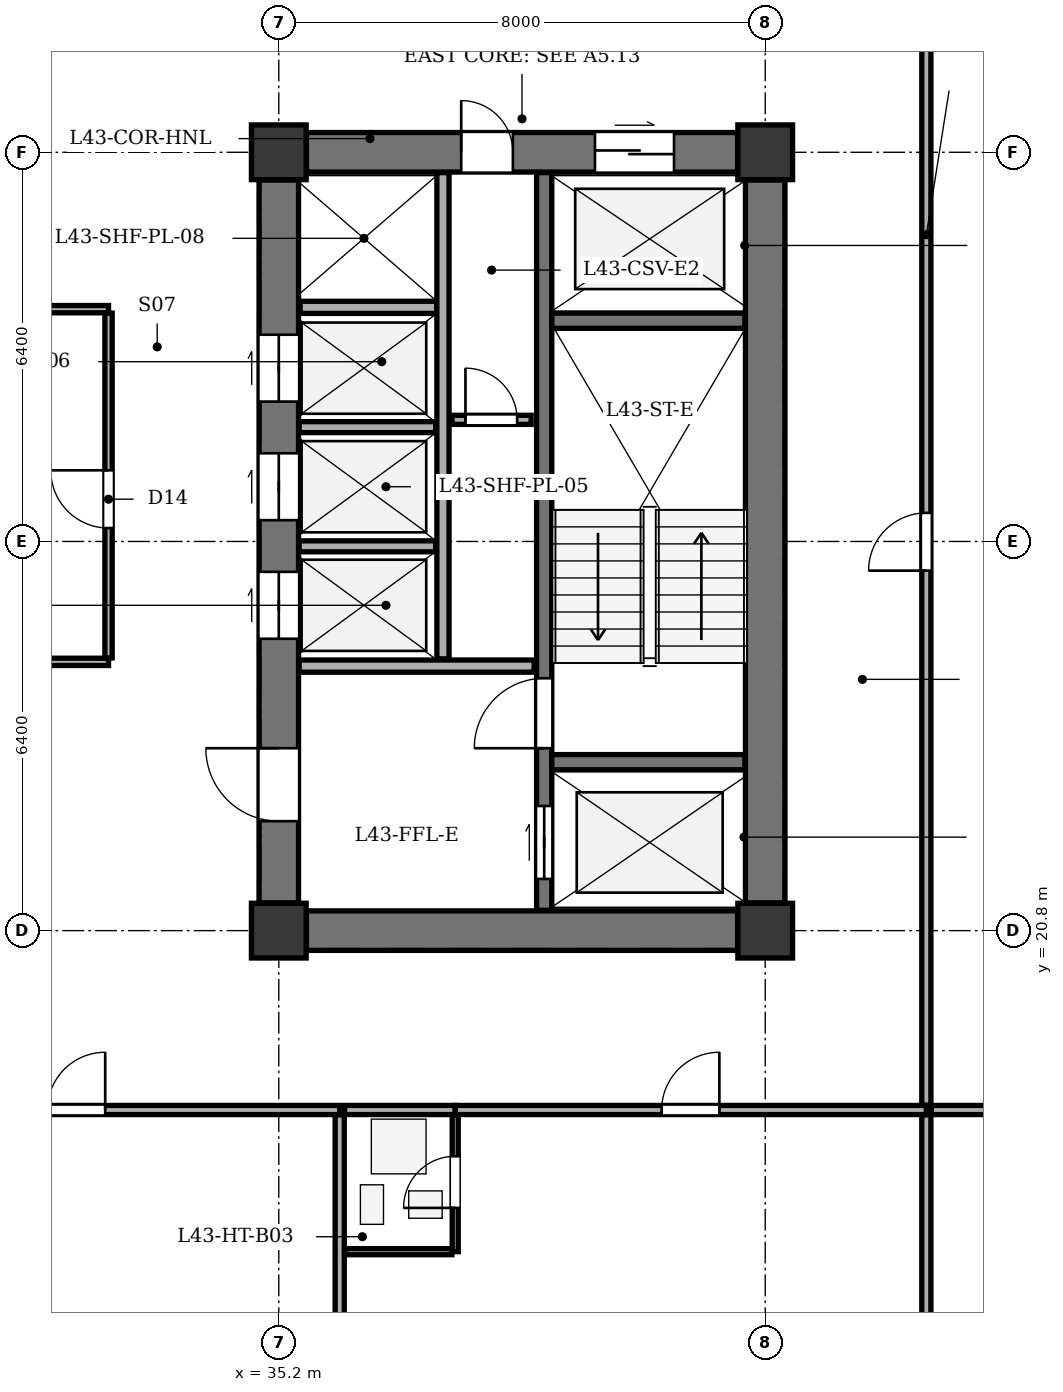
"""IFC4 building model, lengths in metres.
Left out: names, types, materials, properties, quantities, classifications, styles, units other than length and angle.
Written with IfcOpenShell. Run it as: python <this file> out.ifc"""

import sys

from ifc_helpers import new_model, si_unit, direction, frame, frame_2d, origin, origin_2d, place, context, subcontext, project, spatial, rectangle, extrude, element, fill, save


model = new_model("IFC4")
c1 = context("Model", 3, precision=1e-05, world=origin(), true_north=direction((0.0, 1.0)))
c2 = subcontext(c1, "Body", "Model", "MODEL_VIEW")
j1 = project(units=[si_unit("LENGTHUNIT", "METRE"), si_unit("PLANEANGLEUNIT", "RADIAN")], contexts=[c1])
p1 = place(None, origin())
s1 = spatial("IfcSite", under=j1, at=p1, CompositionType="ELEMENT")
p2 = place(p1, origin())
s2 = spatial("IfcBuilding", under=s1, at=p2, CompositionType="ELEMENT")
p3 = place(p2, frame((0.0, 0.0, 169.3)))
s3 = spatial("IfcBuildingStorey", under=s2, at=p3, CompositionType="ELEMENT", Elevation=169.3)
for number, where, z_axis, x_axis in (
    (1, (35.2, 20.8, 0.0), (0.0, 0.0, 1.0), (1.0, 0.0, 0.0)),
    (2, (43.2, 20.8, 0.0), (0.0, 0.0, 1.0), (1.0, 0.0, 0.0)),
    (3, (35.2, 33.6, 0.0), (0.0, 0.0, 1.0), (1.0, 0.0, 0.0)),
    (4, (43.2, 33.6, 0.0), (0.0, 0.0, 1.0), (1.0, 0.0, 0.0)),
):
    element("IfcColumn", number, at=place(p3, frame(where, z_axis=z_axis, x_axis=x_axis)), inside=s3, PredefinedType="COLUMN", context=c2, shape_type="SweptSolid", body=[
        extrude(rectangle(XDim=0.9, YDim=0.9, at=origin_2d()), origin(), (0.0, 0.0, 1.0), 3.5),
    ])
p4 = place(p3, frame((43.2, 21.255, 0.0), z_axis=(0.0, 0.0, 1.0), x_axis=(0.0, 1.0, 0.0)))
e5 = element("IfcWall", 5, at=p4, inside=s3, PredefinedType="SHEAR", context=c2, shape_type="SweptSolid", body=[
    extrude(rectangle(XDim=11.89, YDim=0.65, at=frame_2d((5.945, 0.0))), origin(), (0.0, 0.0, 1.0), 3.2),
])
p5 = place(p3, frame((35.655, 20.8, 0.0), z_axis=(0.0, 0.0, 1.0), x_axis=(1.0, 0.0, 0.0)))
e6 = element("IfcWall", 6, at=p5, inside=s3, PredefinedType="SHEAR", context=c2, shape_type="SweptSolid", body=[
    extrude(rectangle(XDim=7.09, YDim=0.65, at=frame_2d((3.545, 0.0))), origin(), (0.0, 0.0, 1.0), 3.2),
])
p6 = place(p3, frame((35.655, 33.6, 0.0), z_axis=(0.0, 0.0, 1.0), x_axis=(1.0, 0.0, 0.0)))
e7 = element("IfcWall", 7, at=p6, inside=s3, PredefinedType="SHEAR", context=c2, shape_type="SweptSolid", body=[
    extrude(rectangle(XDim=7.09, YDim=0.65, at=frame_2d((3.545, 0.0))), origin(), (0.0, 0.0, 1.0), 3.2),
])
p7 = place(p6, frame((4.745, 0.0, 0.0)))
e8 = element("IfcOpeningElement", 8, at=p7, cuts=e7, PredefinedType="OPENING", context=c2, shape_type="SweptSolid", body=[
    extrude(rectangle(XDim=1.3, YDim=2.15, at=frame_2d((0.65, 1.075))), frame((0.0, 0.335, 0.0), z_axis=(0.0, -1.0, 0.0), x_axis=(1.0, 0.0, 0.0)), (0.0, 0.0, 1.0), 0.67),
])
p8 = place(p6, frame((2.545, 0.0, 0.0)))
e9 = element("IfcOpeningElement", 9, at=p8, cuts=e7, PredefinedType="OPENING", context=c2, shape_type="SweptSolid", body=[
    extrude(rectangle(XDim=0.85, YDim=2.02, at=frame_2d((0.425, 1.01))), frame((0.0, 0.335, 0.0), z_axis=(0.0, -1.0, 0.0), x_axis=(1.0, 0.0, 0.0)), (0.0, 0.0, 1.0), 0.67),
])
p9 = place(p3, frame((35.2, 21.255, 0.0), z_axis=(0.0, 0.0, 1.0), x_axis=(0.0, 1.0, 0.0)))
e10 = element("IfcWall", 10, at=p9, inside=s3, PredefinedType="SHEAR", context=c2, shape_type="SweptSolid", body=[
    extrude(rectangle(XDim=11.89, YDim=0.65, at=frame_2d((5.945, 0.0))), origin(), (0.0, 0.0, 1.0), 3.2),
])
p10 = place(p9, frame((1.345, 0.0, 0.0)))
e11 = element("IfcOpeningElement", 11, at=p10, cuts=e10, PredefinedType="OPENING", context=c2, shape_type="SweptSolid", body=[
    extrude(rectangle(XDim=1.2, YDim=2.15, at=frame_2d((0.6, 1.075))), frame((0.0, 0.335, 0.0), z_axis=(0.0, -1.0, 0.0), x_axis=(1.0, 0.0, 0.0)), (0.0, 0.0, 1.0), 0.67),
])
p11 = place(p9, frame((4.345, 0.0, 0.0)))
e12 = element("IfcOpeningElement", 12, at=p11, cuts=e10, PredefinedType="OPENING", context=c2, shape_type="SweptSolid", body=[
    extrude(rectangle(XDim=1.1, YDim=2.1, at=frame_2d((0.55, 1.05))), frame((0.0, 0.335, 0.0), z_axis=(0.0, -1.0, 0.0), x_axis=(1.0, 0.0, 0.0)), (0.0, 0.0, 1.0), 0.67),
])
p12 = place(p9, frame((6.295, 0.0, 0.0)))
e13 = element("IfcOpeningElement", 13, at=p12, cuts=e10, PredefinedType="OPENING", context=c2, shape_type="SweptSolid", body=[
    extrude(rectangle(XDim=1.1, YDim=2.1, at=frame_2d((0.55, 1.05))), frame((0.0, 0.335, 0.0), z_axis=(0.0, -1.0, 0.0), x_axis=(1.0, 0.0, 0.0)), (0.0, 0.0, 1.0), 0.67),
])
p13 = place(p9, frame((8.245, 0.0, 0.0)))
e14 = element("IfcOpeningElement", 14, at=p13, cuts=e10, PredefinedType="OPENING", context=c2, shape_type="SweptSolid", body=[
    extrude(rectangle(XDim=1.1, YDim=2.1, at=frame_2d((0.55, 1.05))), frame((0.0, 0.335, 0.0), z_axis=(0.0, -1.0, 0.0), x_axis=(1.0, 0.0, 0.0)), (0.0, 0.0, 1.0), 0.67),
])
p14 = place(p3, frame((39.565, 21.135, 0.0), z_axis=(0.0, 0.0, 1.0), x_axis=(0.0, 1.0, 0.0)))
e15 = element("IfcWall", 15, at=p14, inside=s3, PredefinedType="SHEAR", context=c2, shape_type="SweptSolid", body=[
    extrude(rectangle(XDim=12.13, YDim=0.25, at=frame_2d((6.065, 0.0))), origin(), (0.0, 0.0, 1.0), 3.2),
])
p15 = place(p14, frame((0.515, 0.0, 0.0)))
e16 = element("IfcOpeningElement", 16, at=p15, cuts=e15, PredefinedType="OPENING", context=c2, shape_type="SweptSolid", body=[
    extrude(rectangle(XDim=1.2, YDim=2.15, at=frame_2d((0.6, 1.075))), frame((0.0, 0.135, 0.0), z_axis=(0.0, -1.0, 0.0), x_axis=(1.0, 0.0, 0.0)), (0.0, 0.0, 1.0), 0.27),
])
p16 = place(p14, frame((2.665, 0.0, 0.0)))
e17 = element("IfcOpeningElement", 17, at=p16, cuts=e15, PredefinedType="OPENING", context=c2, shape_type="SweptSolid", body=[
    extrude(rectangle(XDim=1.15, YDim=2.15, at=frame_2d((0.575, 1.075))), frame((0.0, 0.135, 0.0), z_axis=(0.0, -1.0, 0.0), x_axis=(1.0, 0.0, 0.0)), (0.0, 0.0, 1.0), 0.27),
])
for number, where, z_axis, x_axis in (
    (18, (39.69, 23.57, 0.0), (0.0, 0.0, 1.0), (1.0, 0.0, 0.0)),
    (19, (39.69, 30.83, 0.0), (0.0, 0.0, 1.0), (1.0, 0.0, 0.0)),
):
    element("IfcWall", number, at=place(p3, frame(where, z_axis=z_axis, x_axis=x_axis)), inside=s3, PredefinedType="SHEAR", context=c2, shape_type="SweptSolid", body=[
        extrude(rectangle(XDim=3.175, YDim=0.25, at=frame_2d((1.587, 0.0))), origin(), (0.0, 0.0, 1.0), 3.2),
    ])
p17 = place(p3, frame((35.535, 25.15, 0.0), z_axis=(0.0, 0.0, 1.0), x_axis=(1.0, 0.0, 0.0)))
e20 = element("IfcWall", 20, at=p17, inside=s3, PredefinedType="SOLIDWALL", context=c2, shape_type="SweptSolid", body=[
    extrude(rectangle(XDim=3.865, YDim=0.2, at=frame_2d((1.933, 0.0))), origin(), (0.0, 0.0, 1.0), 3.2),
])
p18 = place(p3, frame((35.55, 31.05, 0.0), z_axis=(0.0, 0.0, 1.0), x_axis=(1.0, 0.0, 0.0)))
e21 = element("IfcWall", 21, at=p18, inside=s3, PredefinedType="SOLIDWALL", context=c2, shape_type="SweptSolid", body=[
    extrude(rectangle(XDim=2.25, YDim=0.2, at=frame_2d((1.125, 0.0))), origin(), (0.0, 0.0, 1.0), 3.2),
])
p19 = place(p3, frame((37.9, 25.27, 0.0), z_axis=(0.0, 0.0, 1.0), x_axis=(0.0, 1.0, 0.0)))
e22 = element("IfcWall", 22, at=p19, inside=s3, PredefinedType="SOLIDWALL", context=c2, shape_type="SweptSolid", body=[
    extrude(rectangle(XDim=7.995, YDim=0.2, at=frame_2d((3.998, 0.0))), origin(), (0.0, 0.0, 1.0), 3.2),
])
for number, where, z_axis, x_axis in (
    (23, (35.535, 27.12, 0.0), (0.0, 0.0, 1.0), (1.0, 0.0, 0.0)),
    (24, (35.535, 29.08, 0.0), (0.0, 0.0, 1.0), (1.0, 0.0, 0.0)),
):
    element("IfcWall", number, at=place(p3, frame(where, z_axis=z_axis, x_axis=x_axis)), inside=s3, PredefinedType="PARTITIONING", context=c2, shape_type="SweptSolid", body=[
        extrude(rectangle(XDim=2.245, YDim=0.18, at=frame_2d((1.123, 0.0))), origin(), (0.0, 0.0, 1.0), 3.2),
    ])
p20 = place(p3, frame((38.05, 29.2, 0.0), z_axis=(0.0, 0.0, 1.0), x_axis=(1.0, 0.0, 0.0)))
e25 = element("IfcWall", 25, at=p20, inside=s3, PredefinedType="PARTITIONING", context=c2, shape_type="SweptSolid", body=[
    extrude(rectangle(XDim=1.3, YDim=0.15, at=frame_2d((0.65, 0.0))), origin(), (0.0, 0.0, 1.0), 3.2),
])
p21 = place(p20, frame((0.22, 0.0, 0.0)))
e26 = element("IfcOpeningElement", 26, at=p21, cuts=e25, PredefinedType="OPENING", context=c2, shape_type="SweptSolid", body=[
    extrude(rectangle(XDim=0.85, YDim=2.02, at=frame_2d((0.425, 1.01))), frame((0.0, 0.085, 0.0), z_axis=(0.0, -1.0, 0.0), x_axis=(1.0, 0.0, 0.0)), (0.0, 0.0, 1.0), 0.17),
])
p22 = place(p3, frame((20.46, 25.22, 0.0), z_axis=(0.0, 0.0, 1.0), x_axis=(1.0, 0.0, 0.0)))
e27 = element("IfcWall", 27, at=p22, inside=s3, PredefinedType="PARTITIONING", context=c2, shape_type="SweptSolid", body=[
    extrude(rectangle(XDim=11.94, YDim=0.12, at=frame_2d((5.97, 0.0))), origin(), (0.0, 0.0, 1.0), 3.2),
])
p23 = place(p22, frame((2.39, 0.0, 0.0)))
e28 = element("IfcOpeningElement", 28, at=p23, cuts=e27, PredefinedType="OPENING", context=c2, shape_type="SweptSolid", body=[
    extrude(rectangle(XDim=1.0, YDim=2.1, at=frame_2d((0.5, 1.05))), frame((0.0, 0.07, 0.0), z_axis=(0.0, -1.0, 0.0), x_axis=(1.0, 0.0, 0.0)), (0.0, 0.0, 1.0), 0.14),
])
p24 = place(p3, frame((20.46, 31.02, 0.0), z_axis=(0.0, 0.0, 1.0), x_axis=(1.0, 0.0, 0.0)))
e29 = element("IfcWall", 29, at=p24, inside=s3, PredefinedType="PARTITIONING", context=c2, shape_type="SweptSolid", body=[
    extrude(rectangle(XDim=11.94, YDim=0.12, at=frame_2d((5.97, 0.0))), origin(), (0.0, 0.0, 1.0), 3.2),
])
p25 = place(p3, frame((32.4, 25.285, 0.0), z_axis=(0.0, 0.0, 1.0), x_axis=(0.0, 1.0, 0.0)))
e30 = element("IfcWall", 30, at=p25, inside=s3, PredefinedType="PARTITIONING", context=c2, shape_type="SweptSolid", body=[
    extrude(rectangle(XDim=5.67, YDim=0.12, at=frame_2d((2.835, 0.0))), origin(), (0.0, 0.0, 1.0), 3.2),
])
p26 = place(p25, frame((2.135, 0.0, 0.0)))
e31 = element("IfcOpeningElement", 31, at=p26, cuts=e30, PredefinedType="OPENING", context=c2, shape_type="SweptSolid", body=[
    extrude(rectangle(XDim=0.95, YDim=2.1, at=frame_2d((0.475, 1.05))), frame((0.0, 0.07, 0.0), z_axis=(0.0, -1.0, 0.0), x_axis=(1.0, 0.0, 0.0)), (0.0, 0.0, 1.0), 0.14),
])
p27 = place(p3, frame((27.549, 17.85, 0.0), z_axis=(0.0, 0.0, 1.0), x_axis=(1.0, 0.0, 0.0)))
e32 = element("IfcWall", 32, at=p27, inside=s3, PredefinedType="PARTITIONING", context=c2, shape_type="SweptSolid", body=[
    extrude(rectangle(XDim=8.653, YDim=0.15, at=frame_2d((4.326, 0.0))), origin(), (0.0, 0.0, 1.0), 3.2),
])
p28 = place(p27, frame((3.846, 0.0, 0.0)))
e33 = element("IfcOpeningElement", 33, at=p28, cuts=e32, PredefinedType="OPENING", context=c2, shape_type="SweptSolid", body=[
    extrude(rectangle(XDim=0.95, YDim=2.1, at=frame_2d((0.475, 1.05))), frame((0.0, 0.085, 0.0), z_axis=(0.0, -1.0, 0.0), x_axis=(1.0, 0.0, 0.0)), (0.0, 0.0, 1.0), 0.17),
])
p29 = place(p3, frame((36.202, 8.275, 0.0), z_axis=(0.0, 0.0, 1.0), x_axis=(0.0, 1.0, 0.0)))
e34 = element("IfcWall", 34, at=p29, inside=s3, PredefinedType="PARTITIONING", context=c2, shape_type="SweptSolid", body=[
    extrude(rectangle(XDim=9.495, YDim=0.15, at=frame_2d((4.748, 0.0))), origin(), (0.0, 0.0, 1.0), 3.2),
])
p30 = place(p3, frame((36.282, 17.85, 0.0), z_axis=(0.0, 0.0, 1.0), x_axis=(1.0, 0.0, 0.0)))
e35 = element("IfcWall", 35, at=p30, inside=s3, PredefinedType="PARTITIONING", context=c2, shape_type="SweptSolid", body=[
    extrude(rectangle(XDim=1.82, YDim=0.15, at=frame_2d((0.91, 0.0))), origin(), (0.0, 0.0, 1.0), 3.2),
])
p31 = place(p3, frame((38.102, 17.85, 0.0), z_axis=(0.0, 0.0, 1.0), x_axis=(1.0, 0.0, 0.0)))
e36 = element("IfcWall", 36, at=p31, inside=s3, PredefinedType="PARTITIONING", context=c2, shape_type="SweptSolid", body=[
    extrude(rectangle(XDim=7.748, YDim=0.15, at=frame_2d((3.874, 0.0))), origin(), (0.0, 0.0, 1.0), 3.2),
])
p32 = place(p31, frame((3.394, 0.0, 0.0)))
e37 = element("IfcOpeningElement", 37, at=p32, cuts=e36, PredefinedType="OPENING", context=c2, shape_type="SweptSolid", body=[
    extrude(rectangle(XDim=0.95, YDim=2.1, at=frame_2d((0.475, 1.05))), frame((0.0, 0.085, 0.0), z_axis=(0.0, -1.0, 0.0), x_axis=(1.0, 0.0, 0.0)), (0.0, 0.0, 1.0), 0.17),
])
p33 = place(p3, frame((38.102, 15.52, 0.0), z_axis=(0.0, 0.0, 1.0), x_axis=(0.0, 1.0, 0.0)))
e38 = element("IfcWall", 38, at=p33, inside=s3, PredefinedType="PARTITIONING", context=c2, shape_type="SweptSolid", body=[
    extrude(rectangle(XDim=2.25, YDim=0.1, at=frame_2d((1.125, 0.0))), origin(), (0.0, 0.0, 1.0), 3.2),
])
p34 = place(p33, frame((0.72, 0.0, 0.0)))
e39 = element("IfcOpeningElement", 39, at=p34, cuts=e38, PredefinedType="OPENING", context=c2, shape_type="SweptSolid", body=[
    extrude(rectangle(XDim=0.85, YDim=2.05, at=frame_2d((0.425, 1.025))), frame((0.0, 0.06, 0.0), z_axis=(0.0, -1.0, 0.0), x_axis=(1.0, 0.0, 0.0)), (0.0, 0.0, 1.0), 0.12),
])
p35 = place(p3, frame((36.282, 15.52, 0.0), z_axis=(0.0, 0.0, 1.0), x_axis=(1.0, 0.0, 0.0)))
e40 = element("IfcWall", 40, at=p35, inside=s3, PredefinedType="PARTITIONING", context=c2, shape_type="SweptSolid", body=[
    extrude(rectangle(XDim=1.765, YDim=0.1, at=frame_2d((0.883, 0.0))), origin(), (0.0, 0.0, 1.0), 3.2),
])
p36 = place(p3, frame((45.85, 8.275, 0.0), z_axis=(0.0, 0.0, 1.0), x_axis=(0.0, 1.0, 0.0)))
e41 = element("IfcWall", 41, at=p36, inside=s3, PredefinedType="PARTITIONING", context=c2, shape_type="SweptSolid", body=[
    extrude(rectangle(XDim=9.495, YDim=0.15, at=frame_2d((4.748, 0.0))), origin(), (0.0, 0.0, 1.0), 3.2),
])
p37 = place(p3, frame((45.93, 17.85, 0.0), z_axis=(0.0, 0.0, 1.0), x_axis=(1.0, 0.0, 0.0)))
e42 = element("IfcWall", 42, at=p37, inside=s3, PredefinedType="PARTITIONING", context=c2, shape_type="SweptSolid", body=[
    extrude(rectangle(XDim=9.395, YDim=0.15, at=frame_2d((4.698, 0.0))), origin(), (0.0, 0.0, 1.0), 3.2),
])
p38 = place(p3, frame((45.85, 17.93, 0.0), z_axis=(0.0, 0.0, 1.0), x_axis=(0.0, 1.0, 0.0)))
e43 = element("IfcWall", 43, at=p38, inside=s3, PredefinedType="PARTITIONING", context=c2, shape_type="SweptSolid", body=[
    extrude(rectangle(XDim=18.54, YDim=0.15, at=frame_2d((9.27, 0.0))), origin(), (0.0, 0.0, 1.0), 3.2),
])
p39 = place(p38, frame((8.79, 0.0, 0.0)))
e44 = element("IfcOpeningElement", 44, at=p39, cuts=e43, PredefinedType="OPENING", context=c2, shape_type="SweptSolid", body=[
    extrude(rectangle(XDim=0.95, YDim=2.1, at=frame_2d((0.475, 1.05))), frame((0.0, 0.085, 0.0), z_axis=(0.0, -1.0, 0.0), x_axis=(1.0, 0.0, 0.0)), (0.0, 0.0, 1.0), 0.17),
])
p40 = place(p7, origin())
e45 = element("IfcDoor", 45, at=p40, inside=s3, OperationType="DOUBLE_DOOR_SLIDING", PredefinedType="DOOR", context=c2, shape_type="SweptSolid", body=[
    extrude(rectangle(XDim=1.3, YDim=2.15, at=frame_2d((0.65, 1.075))), frame((0.0, 0.025, 0.0), z_axis=(0.0, -1.0, 0.0), x_axis=(1.0, 0.0, 0.0)), (0.0, 0.0, 1.0), 0.05),
])
fill(e8, e45)
p41 = place(p8, origin())
e46 = element("IfcDoor", 46, at=p41, inside=s3, OperationType="SINGLE_SWING_LEFT", PredefinedType="DOOR", context=c2, shape_type="SweptSolid", body=[
    extrude(rectangle(XDim=0.85, YDim=2.02, at=frame_2d((0.425, 1.01))), frame((0.0, 0.025, 0.0), z_axis=(0.0, -1.0, 0.0), x_axis=(1.0, 0.0, 0.0)), (0.0, 0.0, 1.0), 0.05),
])
fill(e9, e46)
p42 = place(p10, origin())
e47 = element("IfcDoor", 47, at=p42, inside=s3, OperationType="SINGLE_SWING_RIGHT", PredefinedType="DOOR", context=c2, shape_type="SweptSolid", body=[
    extrude(rectangle(XDim=1.2, YDim=2.15, at=frame_2d((0.6, 1.075))), frame((0.0, 0.025, 0.0), z_axis=(0.0, -1.0, 0.0), x_axis=(1.0, 0.0, 0.0)), (0.0, 0.0, 1.0), 0.05),
])
fill(e11, e47)
p43 = place(p11, origin())
e48 = element("IfcDoor", 48, at=p43, inside=s3, OperationType="DOUBLE_DOOR_SLIDING", PredefinedType="DOOR", context=c2, shape_type="SweptSolid", body=[
    extrude(rectangle(XDim=1.1, YDim=2.1, at=frame_2d((0.55, 1.05))), frame((0.0, 0.025, 0.0), z_axis=(0.0, -1.0, 0.0), x_axis=(1.0, 0.0, 0.0)), (0.0, 0.0, 1.0), 0.05),
])
fill(e12, e48)
p44 = place(p12, origin())
e49 = element("IfcDoor", 49, at=p44, inside=s3, OperationType="DOUBLE_DOOR_SLIDING", PredefinedType="DOOR", context=c2, shape_type="SweptSolid", body=[
    extrude(rectangle(XDim=1.1, YDim=2.1, at=frame_2d((0.55, 1.05))), frame((0.0, 0.025, 0.0), z_axis=(0.0, -1.0, 0.0), x_axis=(1.0, 0.0, 0.0)), (0.0, 0.0, 1.0), 0.05),
])
fill(e13, e49)
p45 = place(p13, origin())
e50 = element("IfcDoor", 50, at=p45, inside=s3, OperationType="DOUBLE_DOOR_SLIDING", PredefinedType="DOOR", context=c2, shape_type="SweptSolid", body=[
    extrude(rectangle(XDim=1.1, YDim=2.1, at=frame_2d((0.55, 1.05))), frame((0.0, 0.025, 0.0), z_axis=(0.0, -1.0, 0.0), x_axis=(1.0, 0.0, 0.0)), (0.0, 0.0, 1.0), 0.05),
])
fill(e14, e50)
p46 = place(p15, origin())
e51 = element("IfcDoor", 51, at=p46, inside=s3, OperationType="DOUBLE_DOOR_SLIDING", PredefinedType="DOOR", context=c2, shape_type="SweptSolid", body=[
    extrude(rectangle(XDim=1.2, YDim=2.15, at=frame_2d((0.6, 1.075))), frame((0.0, 0.025, 0.0), z_axis=(0.0, -1.0, 0.0), x_axis=(1.0, 0.0, 0.0)), (0.0, 0.0, 1.0), 0.05),
])
fill(e16, e51)
p47 = place(p16, origin())
e52 = element("IfcDoor", 52, at=p47, inside=s3, OperationType="SINGLE_SWING_LEFT", PredefinedType="DOOR", context=c2, shape_type="SweptSolid", body=[
    extrude(rectangle(XDim=1.15, YDim=2.15, at=frame_2d((0.575, 1.075))), frame((0.0, 0.025, 0.0), z_axis=(0.0, -1.0, 0.0), x_axis=(1.0, 0.0, 0.0)), (0.0, 0.0, 1.0), 0.05),
])
fill(e17, e52)
p48 = place(p21, origin())
e53 = element("IfcDoor", 53, at=p48, inside=s3, OperationType="SINGLE_SWING_LEFT", PredefinedType="DOOR", context=c2, shape_type="SweptSolid", body=[
    extrude(rectangle(XDim=0.85, YDim=2.02, at=frame_2d((0.425, 1.01))), frame((0.0, 0.025, 0.0), z_axis=(0.0, -1.0, 0.0), x_axis=(1.0, 0.0, 0.0)), (0.0, 0.0, 1.0), 0.05),
])
fill(e26, e53)
p49 = place(p26, origin())
e54 = element("IfcDoor", 54, at=p49, inside=s3, OperationType="SINGLE_SWING_RIGHT", PredefinedType="DOOR", context=c2, shape_type="SweptSolid", body=[
    extrude(rectangle(XDim=0.95, YDim=2.1, at=frame_2d((0.475, 1.05))), frame((0.0, 0.025, 0.0), z_axis=(0.0, -1.0, 0.0), x_axis=(1.0, 0.0, 0.0)), (0.0, 0.0, 1.0), 0.05),
])
fill(e31, e54)
p50 = place(p28, origin())
e55 = element("IfcDoor", 55, at=p50, inside=s3, OperationType="SINGLE_SWING_RIGHT", PredefinedType="DOOR", context=c2, shape_type="SweptSolid", body=[
    extrude(rectangle(XDim=0.95, YDim=2.1, at=frame_2d((0.475, 1.05))), frame((0.0, 0.025, 0.0), z_axis=(0.0, -1.0, 0.0), x_axis=(1.0, 0.0, 0.0)), (0.0, 0.0, 1.0), 0.05),
])
fill(e33, e55)
p51 = place(p34, origin())
e56 = element("IfcDoor", 56, at=p51, inside=s3, OperationType="SINGLE_SWING_LEFT", PredefinedType="DOOR", context=c2, shape_type="SweptSolid", body=[
    extrude(rectangle(XDim=0.85, YDim=2.05, at=frame_2d((0.425, 1.025))), frame((0.0, 0.025, 0.0), z_axis=(0.0, -1.0, 0.0), x_axis=(1.0, 0.0, 0.0)), (0.0, 0.0, 1.0), 0.05),
])
fill(e39, e56)
p52 = place(p32, origin())
e57 = element("IfcDoor", 57, at=p52, inside=s3, OperationType="SINGLE_SWING_RIGHT", PredefinedType="DOOR", context=c2, shape_type="SweptSolid", body=[
    extrude(rectangle(XDim=0.95, YDim=2.1, at=frame_2d((0.475, 1.05))), frame((0.0, 0.025, 0.0), z_axis=(0.0, -1.0, 0.0), x_axis=(1.0, 0.0, 0.0)), (0.0, 0.0, 1.0), 0.05),
])
fill(e37, e57)
p53 = place(p39, origin())
e58 = element("IfcDoor", 58, at=p53, inside=s3, OperationType="SINGLE_SWING_LEFT", PredefinedType="DOOR", context=c2, shape_type="SweptSolid", body=[
    extrude(rectangle(XDim=0.95, YDim=2.1, at=frame_2d((0.475, 1.05))), frame((0.0, 0.025, 0.0), z_axis=(0.0, -1.0, 0.0), x_axis=(1.0, 0.0, 0.0)), (0.0, 0.0, 1.0), 0.05),
])
fill(e44, e58)
save(model, sys.argv[1])
